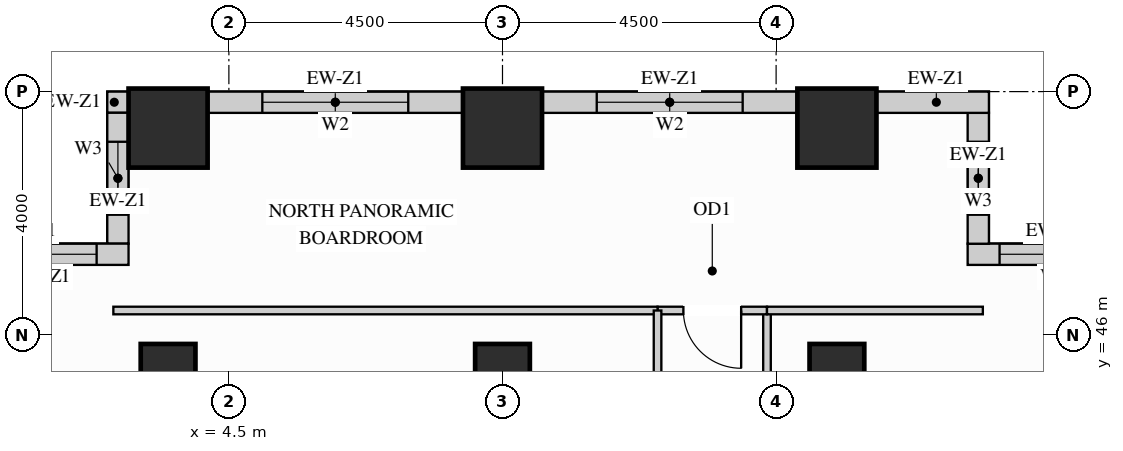
"""IFC4 building model, lengths in metres.
Left out: names, types, materials, properties, quantities, classifications, styles, units other than length and angle.
Written with IfcOpenShell. Run it as: python <this file> out.ifc"""

import sys

from ifc_helpers import new_model, si_unit, direction, frame, frame_2d, origin, origin_2d, place, context, subcontext, project, spatial, rectangle, extrude, source, transform, mapped, element, fill, save


model = new_model("IFC4")
c1 = context("Model", 3, precision=1e-05, world=origin(), true_north=direction((0.0, 1.0)))
c2 = subcontext(c1, "Body", "Model", "MODEL_VIEW")
j1 = project(units=[si_unit("LENGTHUNIT", "METRE"), si_unit("PLANEANGLEUNIT", "RADIAN")], contexts=[c1])
p1 = place(None, origin())
s1 = spatial("IfcSite", under=j1, at=p1, CompositionType="ELEMENT")
p2 = place(p1, origin())
s2 = spatial("IfcBuilding", under=s1, at=p2, CompositionType="ELEMENT")
p3 = place(p2, frame((0.0, 0.0, 26.1)))
s3 = spatial("IfcBuildingStorey", under=s2, at=p3, CompositionType="ELEMENT", Elevation=26.1)
m1 = source(origin(), c2, "Body", "SweptSolid", [
    extrude(rectangle(XDim=0.9, YDim=0.9, at=origin_2d()), origin(), (0.0, 0.0, 1.0), 3.38),
])
for number, where, z_axis, x_axis in (
    (1, (14.5, 45.4, 0.0), (0.0, 0.0, 1.0), (1.0, 0.0, 0.0)),
    (2, (3.5, 45.4, 0.0), (0.0, 0.0, 1.0), (1.0, 0.0, 0.0)),
    (3, (9.0, 45.4, 0.0), (0.0, 0.0, 1.0), (1.0, 0.0, 0.0)),
):
    element("IfcColumn", number, at=place(p3, frame(where, z_axis=z_axis, x_axis=x_axis)), inside=s3, PredefinedType="COLUMN", context=c2, shape_type="MappedRepresentation", body=[
        mapped(m1, transform((0.0, 0.0, 0.0), x_axis=(1.0, 0.0, 0.0), y_axis=(0.0, 1.0, 0.0), z_axis=(0.0, 0.0, 1.0))),
    ])
m2 = source(origin(), c2, "Body", "SweptSolid", [
    extrude(rectangle(XDim=1.3, YDim=1.3, at=origin_2d()), origin(), (0.0, 0.0, 1.0), 3.38),
])
for number, where, z_axis, x_axis in (
    (4, (14.5, 49.4, 0.0), (0.0, 0.0, 1.0), (1.0, 0.0, 0.0)),
    (5, (3.5, 49.4, 0.0), (0.0, 0.0, 1.0), (1.0, 0.0, 0.0)),
    (6, (9.0, 49.4, 0.0), (0.0, 0.0, 1.0), (1.0, 0.0, 0.0)),
):
    element("IfcColumn", number, at=place(p3, frame(where, z_axis=z_axis, x_axis=x_axis)), inside=s3, PredefinedType="COLUMN", context=c2, shape_type="MappedRepresentation", body=[
        mapped(m2, transform((0.0, 0.0, 0.0), x_axis=(1.0, 0.0, 0.0), y_axis=(0.0, 1.0, 0.0), z_axis=(0.0, 0.0, 1.0))),
    ])
p4 = place(p3, frame((19.5, 47.325, 0.0), z_axis=(0.0, 0.0, 1.0), x_axis=(-1.0, 0.0, 0.0)))
e7 = element("IfcWall", 7, at=p4, inside=s3, PredefinedType="SOLIDWALL", context=c2, shape_type="SweptSolid", body=[
    extrude(rectangle(XDim=2.85, YDim=0.35, at=frame_2d((1.425, 0.0))), origin(), (0.0, 0.0, 1.0), 3.365),
])
p5 = place(p4, frame((0.525, 0.0, 0.78)))
e8 = element("IfcOpeningElement", 8, at=p5, cuts=e7, PredefinedType="OPENING", context=c2, shape_type="SweptSolid", body=[
    extrude(rectangle(XDim=1.8, YDim=2.1, at=frame_2d((0.9, 1.05))), frame((0.0, 0.185, 0.0), z_axis=(0.0, -1.0, 0.0), x_axis=(1.0, 0.0, 0.0)), (0.0, 0.0, 1.0), 0.37),
])
p6 = place(p3, frame((16.825, 47.498, 0.0), z_axis=(0.0, 0.0, 1.0), x_axis=(0.0, 1.0, 0.0)))
e9 = element("IfcWall", 9, at=p6, inside=s3, PredefinedType="SOLIDWALL", context=c2, shape_type="SweptSolid", body=[
    extrude(rectangle(XDim=2.154, YDim=0.35, at=frame_2d((1.077, 0.0))), origin(), (0.0, 0.0, 1.0), 3.365),
])
p7 = place(p6, frame((0.477, 0.0, 0.78)))
e10 = element("IfcOpeningElement", 10, at=p7, cuts=e9, PredefinedType="OPENING", context=c2, shape_type="SweptSolid", body=[
    extrude(rectangle(XDim=1.2, YDim=2.1, at=frame_2d((0.6, 1.05))), frame((0.0, 0.185, 0.0), z_axis=(0.0, -1.0, 0.0), x_axis=(1.0, 0.0, 0.0)), (0.0, 0.0, 1.0), 0.37),
])
m3 = source(origin(), c2, "Body", "SweptSolid", [
    extrude(rectangle(XDim=1.852, YDim=0.35, at=frame_2d((0.926, 0.0))), origin(), (0.0, 0.0, 1.0), 3.365),
])
p8 = place(p3, frame((17.0, 49.825, 0.0), z_axis=(0.0, 0.0, 1.0), x_axis=(-1.0, 0.0, 0.0)))
e11 = element("IfcWall", 11, at=p8, inside=s3, PredefinedType="SOLIDWALL", context=c2, shape_type="MappedRepresentation", body=[
    mapped(m3, transform((0.0, 0.0, 0.0), x_axis=(1.0, 0.0, 0.0), y_axis=(0.0, 1.0, 0.0), z_axis=(0.0, 0.0, 1.0))),
])
p9 = place(p3, frame((13.852, 49.825, 0.0), z_axis=(0.0, 0.0, 1.0), x_axis=(-1.0, 0.0, 0.0)))
e12 = element("IfcWall", 12, at=p9, inside=s3, PredefinedType="SOLIDWALL", context=c2, shape_type="SweptSolid", body=[
    extrude(rectangle(XDim=4.204, YDim=0.35, at=frame_2d((2.102, 0.0))), origin(), (0.0, 0.0, 1.0), 2.51),
])
p10 = place(p9, frame((0.902, 0.0, 0.78)))
e13 = element("IfcOpeningElement", 13, at=p10, cuts=e12, PredefinedType="OPENING", context=c2, shape_type="SweptSolid", body=[
    extrude(rectangle(XDim=2.4, YDim=1.55, at=frame_2d((1.2, 0.775))), frame((0.0, 0.185, 0.0), z_axis=(0.0, -1.0, 0.0), x_axis=(1.0, 0.0, 0.0)), (0.0, 0.0, 1.0), 0.37),
])
p11 = place(p3, frame((8.352, 49.825, 0.0), z_axis=(0.0, 0.0, 1.0), x_axis=(-1.0, 0.0, 0.0)))
e14 = element("IfcWall", 14, at=p11, inside=s3, PredefinedType="SOLIDWALL", context=c2, shape_type="SweptSolid", body=[
    extrude(rectangle(XDim=4.204, YDim=0.35, at=frame_2d((2.102, 0.0))), origin(), (0.0, 0.0, 1.0), 2.51),
])
p12 = place(p11, frame((0.902, 0.0, 0.78)))
e15 = element("IfcOpeningElement", 15, at=p12, cuts=e14, PredefinedType="OPENING", context=c2, shape_type="SweptSolid", body=[
    extrude(rectangle(XDim=2.4, YDim=1.55, at=frame_2d((1.2, 0.775))), frame((0.0, 0.185, 0.0), z_axis=(0.0, -1.0, 0.0), x_axis=(1.0, 0.0, 0.0)), (0.0, 0.0, 1.0), 0.37),
])
m4 = source(origin(), c2, "Body", "SweptSolid", [
    extrude(rectangle(XDim=0.352, YDim=0.35, at=frame_2d((0.176, 0.0))), origin(), (0.0, 0.0, 1.0), 3.365),
])
p13 = place(p3, frame((2.852, 49.825, 0.0), z_axis=(0.0, 0.0, 1.0), x_axis=(-1.0, 0.0, 0.0)))
e16 = element("IfcWall", 16, at=p13, inside=s3, PredefinedType="SOLIDWALL", context=c2, shape_type="MappedRepresentation", body=[
    mapped(m4, transform((0.0, 0.0, 0.0), x_axis=(1.0, 0.0, 0.0), y_axis=(0.0, 1.0, 0.0), z_axis=(0.0, 0.0, 1.0))),
])
p14 = place(p3, frame((2.675, 49.652, 0.0), z_axis=(0.0, 0.0, 1.0), x_axis=(0.0, -1.0, 0.0)))
e17 = element("IfcWall", 17, at=p14, inside=s3, PredefinedType="SOLIDWALL", context=c2, shape_type="SweptSolid", body=[
    extrude(rectangle(XDim=2.154, YDim=0.35, at=frame_2d((1.077, 0.0))), origin(), (0.0, 0.0, 1.0), 3.365),
])
p15 = place(p14, frame((0.477, 0.0, 0.78)))
e18 = element("IfcOpeningElement", 18, at=p15, cuts=e17, PredefinedType="OPENING", context=c2, shape_type="SweptSolid", body=[
    extrude(rectangle(XDim=1.2, YDim=2.1, at=frame_2d((0.6, 1.05))), frame((0.0, 0.185, 0.0), z_axis=(0.0, -1.0, 0.0), x_axis=(1.0, 0.0, 0.0)), (0.0, 0.0, 1.0), 0.37),
])
p16 = place(p3, frame((2.85, 47.325, 0.0), z_axis=(0.0, 0.0, 1.0), x_axis=(-1.0, 0.0, 0.0)))
e19 = element("IfcWall", 19, at=p16, inside=s3, PredefinedType="SOLIDWALL", context=c2, shape_type="SweptSolid", body=[
    extrude(rectangle(XDim=2.85, YDim=0.35, at=frame_2d((1.425, 0.0))), origin(), (0.0, 0.0, 1.0), 3.365),
])
p17 = place(p16, frame((0.525, 0.0, 0.78)))
e20 = element("IfcOpeningElement", 20, at=p17, cuts=e19, PredefinedType="OPENING", context=c2, shape_type="SweptSolid", body=[
    extrude(rectangle(XDim=1.8, YDim=2.1, at=frame_2d((0.9, 1.05))), frame((0.0, 0.185, 0.0), z_axis=(0.0, -1.0, 0.0), x_axis=(1.0, 0.0, 0.0)), (0.0, 0.0, 1.0), 0.37),
])
p18 = place(p3, frame((13.35, 39.752, 0.0), z_axis=(0.0, 0.0, 1.0), x_axis=(0.0, 1.0, 0.0)))
e21 = element("IfcWall", 21, at=p18, inside=s3, PredefinedType="PARTITIONING", context=c2, shape_type="SweptSolid", body=[
    extrude(rectangle(XDim=6.648, YDim=0.125, at=frame_2d((3.324, 0.0))), origin(), (0.0, 0.0, 1.0), 3.365),
])
p19 = place(p18, frame((2.849, 0.0, 0.0)))
e22 = element("IfcOpeningElement", 22, at=p19, cuts=e21, PredefinedType="OPENING", context=c2, shape_type="SweptSolid", body=[
    extrude(rectangle(XDim=0.95, YDim=2.15, at=frame_2d((0.475, 1.075))), frame((0.0, 0.073, 0.0), z_axis=(0.0, -1.0, 0.0), x_axis=(1.0, 0.0, 0.0)), (0.0, 0.0, 1.0), 0.145),
])
p20 = place(p3, frame((11.55, 46.4, 0.0), z_axis=(0.0, 0.0, 1.0), x_axis=(1.0, 0.0, 0.0)))
e23 = element("IfcWall", 23, at=p20, inside=s3, PredefinedType="PARTITIONING", context=c2, shape_type="SweptSolid", body=[
    extrude(rectangle(XDim=1.8, YDim=0.125, at=frame_2d((0.9, 0.0))), origin(), (0.0, 0.0, 1.0), 3.365),
])
p21 = place(p20, frame((0.425, 0.0, 0.0)))
e24 = element("IfcOpeningElement", 24, at=p21, cuts=e23, PredefinedType="OPENING", context=c2, shape_type="SweptSolid", body=[
    extrude(rectangle(XDim=0.95, YDim=2.15, at=frame_2d((0.475, 1.075))), frame((0.0, 0.073, 0.0), z_axis=(0.0, -1.0, 0.0), x_axis=(1.0, 0.0, 0.0)), (0.0, 0.0, 1.0), 0.145),
])
m5 = source(origin(), c2, "Body", "SweptSolid", [
    extrude(rectangle(XDim=3.55, YDim=0.125, at=frame_2d((1.775, 0.0))), origin(), (0.0, 0.0, 1.0), 3.365),
])
p22 = place(p3, frame((13.35, 46.4, 0.0), z_axis=(0.0, 0.0, 1.0), x_axis=(1.0, 0.0, 0.0)))
e25 = element("IfcWall", 25, at=p22, inside=s3, PredefinedType="PARTITIONING", context=c2, shape_type="MappedRepresentation", body=[
    mapped(m5, transform((0.0, 0.0, 0.0), x_axis=(1.0, 0.0, 0.0), y_axis=(0.0, 1.0, 0.0), z_axis=(0.0, 0.0, 1.0))),
])
m6 = source(origin(), c2, "Body", "SweptSolid", [
    extrude(rectangle(XDim=8.95, YDim=0.125, at=frame_2d((4.475, 0.0))), origin(), (0.0, 0.0, 1.0), 3.365),
])
p23 = place(p3, frame((2.6, 46.4, 0.0), z_axis=(0.0, 0.0, 1.0), x_axis=(1.0, 0.0, 0.0)))
e26 = element("IfcWall", 26, at=p23, inside=s3, PredefinedType="PARTITIONING", context=c2, shape_type="MappedRepresentation", body=[
    mapped(m6, transform((0.0, 0.0, 0.0), x_axis=(1.0, 0.0, 0.0), y_axis=(0.0, 1.0, 0.0), z_axis=(0.0, 0.0, 1.0))),
])
p24 = place(p3, frame((11.55, 42.245, 0.0), z_axis=(0.0, 0.0, 1.0), x_axis=(0.0, 1.0, 0.0)))
e27 = element("IfcWall", 27, at=p24, inside=s3, PredefinedType="PARTITIONING", context=c2, shape_type="SweptSolid", body=[
    extrude(rectangle(XDim=4.155, YDim=0.125, at=frame_2d((2.077, 0.0))), origin(), (0.0, 0.0, 1.0), 3.365),
])
p25 = place(p24, frame((1.603, 0.0, 0.0)))
e28 = element("IfcOpeningElement", 28, at=p25, cuts=e27, PredefinedType="OPENING", context=c2, shape_type="SweptSolid", body=[
    extrude(rectangle(XDim=0.95, YDim=2.15, at=frame_2d((0.475, 1.075))), frame((0.0, 0.073, 0.0), z_axis=(0.0, -1.0, 0.0), x_axis=(1.0, 0.0, 0.0)), (0.0, 0.0, 1.0), 0.145),
])
m7 = source(origin(), c2, "Body", "SweptSolid", [
    extrude(rectangle(XDim=0.95, YDim=2.15, at=frame_2d((0.475, 1.075))), frame((0.0, 0.025, 0.0), z_axis=(0.0, -1.0, 0.0), x_axis=(1.0, 0.0, 0.0)), (0.0, 0.0, 1.0), 0.05),
])
p26 = place(p21, origin())
e29 = element("IfcDoor", 29, at=p26, inside=s3, OperationType="SINGLE_SWING_RIGHT", PredefinedType="DOOR", context=c2, shape_type="MappedRepresentation", body=[
    mapped(m7, transform((0.0, 0.0, 0.0), x_axis=(1.0, 0.0, 0.0), y_axis=(0.0, 1.0, 0.0), z_axis=(0.0, 0.0, 1.0))),
])
fill(e24, e29)
m8 = source(origin(), c2, "Body", "SweptSolid", [
    extrude(rectangle(XDim=1.8, YDim=2.1, at=frame_2d((0.9, 1.05))), frame((0.0, 0.03, 0.0), z_axis=(0.0, -1.0, 0.0), x_axis=(1.0, 0.0, 0.0)), (0.0, 0.0, 1.0), 0.06),
])
p27 = place(p5, origin())
e30 = element("IfcWindow", 30, at=p27, inside=s3, PartitioningType="SINGLE_PANEL", PredefinedType="WINDOW", context=c2, shape_type="MappedRepresentation", body=[
    mapped(m8, transform((0.0, 0.0, 0.0), x_axis=(1.0, 0.0, 0.0), y_axis=(0.0, 1.0, 0.0), z_axis=(0.0, 0.0, 1.0))),
])
fill(e8, e30)
p28 = place(p17, origin())
e31 = element("IfcWindow", 31, at=p28, inside=s3, PartitioningType="SINGLE_PANEL", PredefinedType="WINDOW", context=c2, shape_type="MappedRepresentation", body=[
    mapped(m8, transform((0.0, 0.0, 0.0), x_axis=(1.0, 0.0, 0.0), y_axis=(0.0, 1.0, 0.0), z_axis=(0.0, 0.0, 1.0))),
])
fill(e20, e31)
m9 = source(origin(), c2, "Body", "SweptSolid", [
    extrude(rectangle(XDim=2.4, YDim=1.55, at=frame_2d((1.2, 0.775))), frame((0.0, 0.03, 0.0), z_axis=(0.0, -1.0, 0.0), x_axis=(1.0, 0.0, 0.0)), (0.0, 0.0, 1.0), 0.06),
])
p29 = place(p10, origin())
e32 = element("IfcWindow", 32, at=p29, inside=s3, PartitioningType="SINGLE_PANEL", PredefinedType="WINDOW", context=c2, shape_type="MappedRepresentation", body=[
    mapped(m9, transform((0.0, 0.0, 0.0), x_axis=(1.0, 0.0, 0.0), y_axis=(0.0, 1.0, 0.0), z_axis=(0.0, 0.0, 1.0))),
])
fill(e13, e32)
p30 = place(p12, origin())
e33 = element("IfcWindow", 33, at=p30, inside=s3, PartitioningType="SINGLE_PANEL", PredefinedType="WINDOW", context=c2, shape_type="MappedRepresentation", body=[
    mapped(m9, transform((0.0, 0.0, 0.0), x_axis=(1.0, 0.0, 0.0), y_axis=(0.0, 1.0, 0.0), z_axis=(0.0, 0.0, 1.0))),
])
fill(e15, e33)
m10 = source(origin(), c2, "Body", "SweptSolid", [
    extrude(rectangle(XDim=1.2, YDim=2.1, at=frame_2d((0.6, 1.05))), frame((0.0, 0.03, 0.0), z_axis=(0.0, -1.0, 0.0), x_axis=(1.0, 0.0, 0.0)), (0.0, 0.0, 1.0), 0.06),
])
p31 = place(p7, origin())
e34 = element("IfcWindow", 34, at=p31, inside=s3, PartitioningType="SINGLE_PANEL", PredefinedType="WINDOW", context=c2, shape_type="MappedRepresentation", body=[
    mapped(m10, transform((0.0, 0.0, 0.0), x_axis=(1.0, 0.0, 0.0), y_axis=(0.0, 1.0, 0.0), z_axis=(0.0, 0.0, 1.0))),
])
fill(e10, e34)
p32 = place(p15, origin())
e35 = element("IfcWindow", 35, at=p32, inside=s3, PartitioningType="SINGLE_PANEL", PredefinedType="WINDOW", context=c2, shape_type="MappedRepresentation", body=[
    mapped(m10, transform((0.0, 0.0, 0.0), x_axis=(1.0, 0.0, 0.0), y_axis=(0.0, 1.0, 0.0), z_axis=(0.0, 0.0, 1.0))),
])
fill(e18, e35)
save(model, sys.argv[1])
